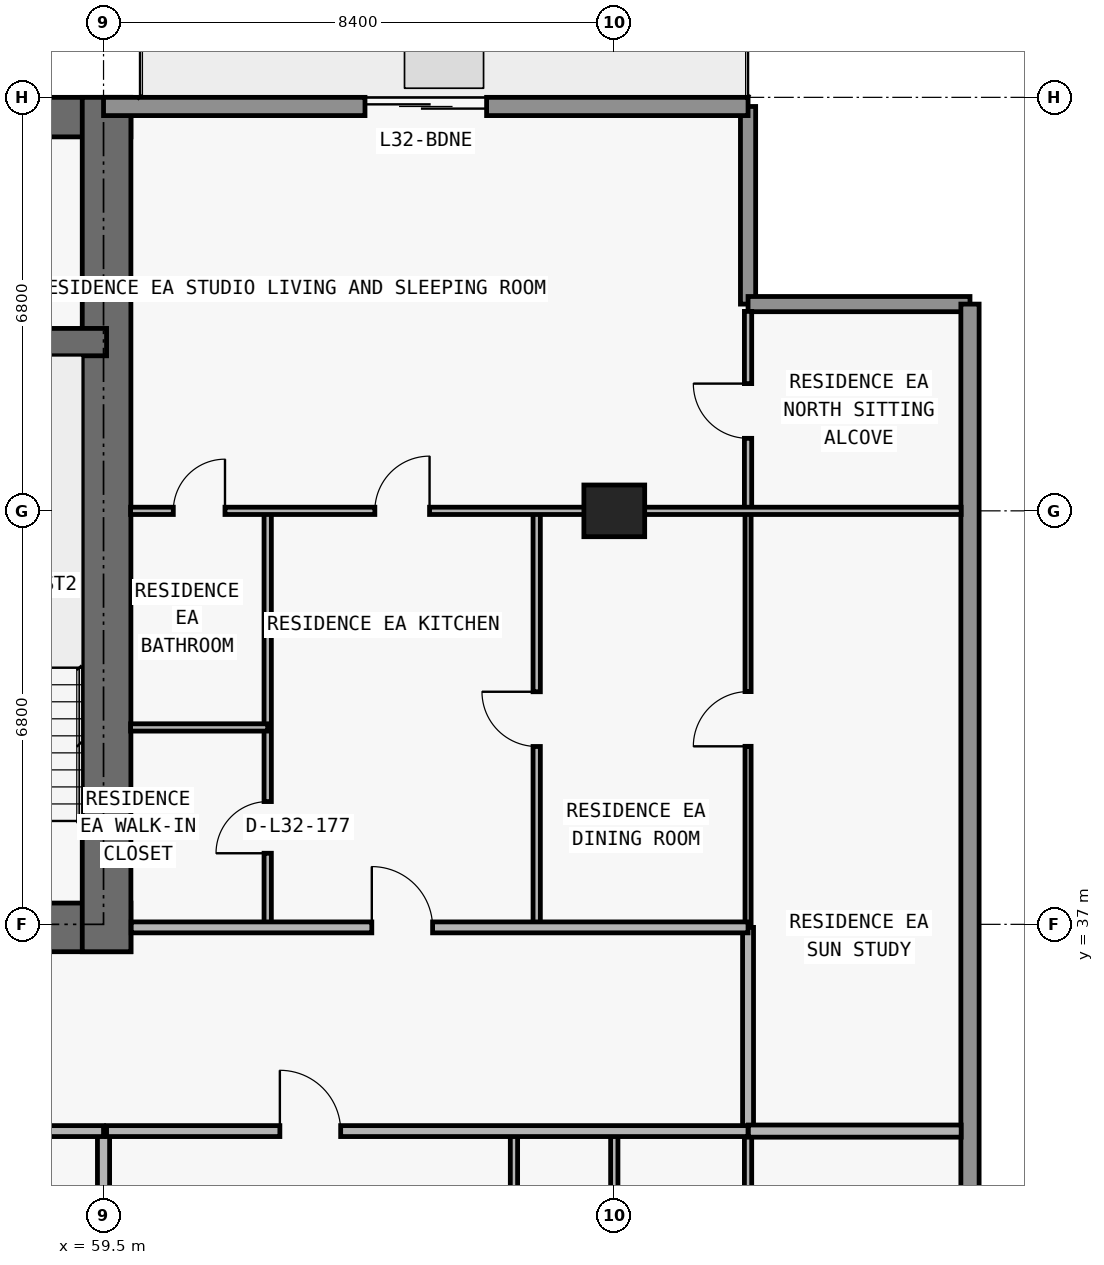
"""IFC4 building model, lengths in metres.
Left out: names, types, materials, properties, quantities, classifications, styles, units other than length and angle.
Written with IfcOpenShell. Run it as: python <this file> out.ifc"""

import sys

from ifc_helpers import new_model, si_unit, direction, frame, frame_2d, origin, origin_2d, place, context, subcontext, project, spatial, rectangle, extrude, element, fill, save


model = new_model("IFC4")
c1 = context("Model", 3, precision=1e-05, world=origin(), true_north=direction((0.0, 1.0)))
c2 = subcontext(c1, "Body", "Model", "MODEL_VIEW")
j1 = project(units=[si_unit("LENGTHUNIT", "METRE"), si_unit("PLANEANGLEUNIT", "RADIAN")], contexts=[c1])
p1 = place(None, origin())
s1 = spatial("IfcSite", under=j1, at=p1, CompositionType="ELEMENT")
p2 = place(p1, origin())
s2 = spatial("IfcBuilding", under=s1, at=p2, CompositionType="ELEMENT")
p3 = place(p2, frame((0.0, 0.0, 119.1)))
s3 = spatial("IfcBuildingStorey", under=s2, at=p3, CompositionType="ELEMENT", Elevation=119.1)
p4 = place(p3, frame((67.9, 43.8, 0.0), z_axis=(0.0, 0.0, 1.0), x_axis=(1.0, 0.0, 0.0)))
e1 = element("IfcColumn", 1, at=p4, inside=s3, PredefinedType="COLUMN", context=c2, shape_type="SweptSolid", body=[
    extrude(rectangle(XDim=1.0, YDim=0.85, at=origin_2d()), origin(), (0.0, 0.0, 1.0), 3.05),
])
p5 = place(p3, frame((17.85, 36.95, 0.0), z_axis=(0.0, 0.0, 1.0), x_axis=(1.0, 0.0, 0.0)))
e2 = element("IfcWall", 2, at=p5, inside=s3, PredefinedType="SHEAR", context=c2, shape_type="SweptSolid", body=[
    extrude(rectangle(XDim=42.1, YDim=0.8, at=frame_2d((21.05, 0.0))), origin(), (0.0, 0.0, 1.0), 3.05),
])
p6 = place(p5, frame((14.45, 0.0, 0.0)))
e3 = element("IfcOpeningElement", 3, at=p6, cuts=e2, PredefinedType="OPENING", context=c2, shape_type="SweptSolid", body=[
    extrude(rectangle(XDim=1.1, YDim=2.15, at=frame_2d((0.55, 1.075))), frame((0.0, 0.41, 0.0), z_axis=(0.0, -1.0, 0.0), x_axis=(1.0, 0.0, 0.0)), (0.0, 0.0, 1.0), 0.82),
])
p7 = place(p5, frame((6.3, 0.0, 0.0)))
e4 = element("IfcOpeningElement", 4, at=p7, cuts=e2, PredefinedType="OPENING", context=c2, shape_type="SweptSolid", body=[
    extrude(rectangle(XDim=1.05, YDim=2.15, at=frame_2d((0.525, 1.075))), frame((0.0, 0.41, 0.0), z_axis=(0.0, -1.0, 0.0), x_axis=(1.0, 0.0, 0.0)), (0.0, 0.0, 1.0), 0.82),
])
p8 = place(p5, frame((34.8, 0.0, 0.0)))
e5 = element("IfcOpeningElement", 5, at=p8, cuts=e2, PredefinedType="OPENING", context=c2, shape_type="SweptSolid", body=[
    extrude(rectangle(XDim=1.05, YDim=2.15, at=frame_2d((0.525, 1.075))), frame((0.0, 0.41, 0.0), z_axis=(0.0, -1.0, 0.0), x_axis=(1.0, 0.0, 0.0)), (0.0, 0.0, 1.0), 0.82),
])
p9 = place(p5, frame((10.913, 0.0, 0.0)))
e6 = element("IfcOpeningElement", 6, at=p9, cuts=e2, PredefinedType="OPENING", context=c2, shape_type="SweptSolid", body=[
    extrude(rectangle(XDim=1.05, YDim=2.15, at=frame_2d((0.525, 1.075))), frame((0.0, 0.41, 0.0), z_axis=(0.0, -1.0, 0.0), x_axis=(1.0, 0.0, 0.0)), (0.0, 0.0, 1.0), 0.82),
])
p10 = place(p5, frame((24.15, 0.0, 0.0)))
e7 = element("IfcOpeningElement", 7, at=p10, cuts=e2, PredefinedType="OPENING", context=c2, shape_type="SweptSolid", body=[
    extrude(rectangle(XDim=1.05, YDim=2.15, at=frame_2d((0.525, 1.075))), frame((0.0, 0.41, 0.0), z_axis=(0.0, -1.0, 0.0), x_axis=(1.0, 0.0, 0.0)), (0.0, 0.0, 1.0), 0.82),
])
p11 = place(p3, frame((17.85, 50.275, 0.0), z_axis=(0.0, 0.0, 1.0), x_axis=(1.0, 0.0, 0.0)))
e8 = element("IfcWall", 8, at=p11, inside=s3, PredefinedType="SHEAR", context=c2, shape_type="SweptSolid", body=[
    extrude(rectangle(XDim=42.1, YDim=0.65, at=frame_2d((21.05, 0.0))), origin(), (0.0, 0.0, 1.0), 3.05),
])
p12 = place(p3, frame((59.55, 36.55, 0.0), z_axis=(0.0, 0.0, 1.0), x_axis=(0.0, 1.0, 0.0)))
e9 = element("IfcWall", 9, at=p12, inside=s3, PredefinedType="SHEAR", context=c2, shape_type="SweptSolid", body=[
    extrude(rectangle(XDim=14.05, YDim=0.8, at=frame_2d((7.025, 0.0))), origin(), (0.0, 0.0, 1.0), 3.05),
])
p13 = place(p3, frame((18.25, 46.575, 0.0), z_axis=(0.0, 0.0, 1.0), x_axis=(1.0, 0.0, 0.0)))
e10 = element("IfcWall", 10, at=p13, inside=s3, PredefinedType="SHEAR", context=c2, shape_type="SweptSolid", body=[
    extrude(rectangle(XDim=41.3, YDim=0.45, at=frame_2d((20.65, 0.0))), origin(), (0.0, 0.0, 1.0), 3.05),
])
p14 = place(p13, frame((7.65, 0.0, 0.0)))
e11 = element("IfcOpeningElement", 11, at=p14, cuts=e10, PredefinedType="OPENING", context=c2, shape_type="SweptSolid", body=[
    extrude(rectangle(XDim=1.0, YDim=2.2, at=frame_2d((0.5, 1.1))), frame((0.0, 0.235, 0.0), z_axis=(0.0, -1.0, 0.0), x_axis=(1.0, 0.0, 0.0)), (0.0, 0.0, 1.0), 0.47),
])
p15 = place(p13, frame((32.675, 0.0, 0.0)))
e12 = element("IfcOpeningElement", 12, at=p15, cuts=e10, PredefinedType="OPENING", context=c2, shape_type="SweptSolid", body=[
    extrude(rectangle(XDim=1.05, YDim=2.15, at=frame_2d((0.525, 1.075))), frame((0.0, 0.235, 0.0), z_axis=(0.0, -1.0, 0.0), x_axis=(1.0, 0.0, 0.0)), (0.0, 0.0, 1.0), 0.47),
])
p16 = place(p3, frame((70.1, 50.45, 0.0), z_axis=(0.0, 0.0, 1.0), x_axis=(0.0, -1.0, 0.0)))
e13 = element("IfcWall", 13, at=p16, inside=s3, PredefinedType="ELEMENTEDWALL", context=c2, shape_type="SweptSolid", body=[
    extrude(rectangle(XDim=3.25, YDim=0.25, at=frame_2d((1.625, 0.0))), origin(), (0.0, 0.0, 1.0), 3.05),
])
p17 = place(p3, frame((70.1, 47.2, 0.0), z_axis=(0.0, 0.0, 1.0), x_axis=(1.0, 0.0, 0.0)))
e14 = element("IfcWall", 14, at=p17, inside=s3, PredefinedType="ELEMENTEDWALL", context=c2, shape_type="SweptSolid", body=[
    extrude(rectangle(XDim=3.65, YDim=0.25, at=frame_2d((1.825, 0.0))), origin(), (0.0, 0.0, 1.0), 3.05),
])
p18 = place(p3, frame((73.75, 47.2, 0.0), z_axis=(0.0, 0.0, 1.0), x_axis=(0.0, -1.0, 0.0)))
e15 = element("IfcWall", 15, at=p18, inside=s3, PredefinedType="STANDARD", context=c2, shape_type="SweptSolid", body=[
    extrude(rectangle(XDim=19.2, YDim=0.3, at=frame_2d((9.6, 0.0))), origin(), (0.0, 0.0, 1.0), 3.05),
])
p19 = place(p3, frame((59.5, 50.45, 0.0), z_axis=(0.0, 0.0, 1.0), x_axis=(1.0, 0.0, 0.0)))
e16 = element("IfcWall", 16, at=p19, inside=s3, PredefinedType="STANDARD", context=c2, shape_type="SweptSolid", body=[
    extrude(rectangle(XDim=10.6, YDim=0.3, at=frame_2d((5.3, 0.0))), origin(), (0.0, 0.0, 1.0), 3.05),
])
p20 = place(p19, frame((4.3, 0.0, 0.0)))
e17 = element("IfcOpeningElement", 17, at=p20, cuts=e16, PredefinedType="OPENING", context=c2, shape_type="SweptSolid", body=[
    extrude(rectangle(XDim=2.0, YDim=2.3, at=frame_2d((1.0, 1.15))), frame((0.0, 0.16, 0.0), z_axis=(0.0, -1.0, 0.0), x_axis=(1.0, 0.0, 0.0)), (0.0, 0.0, 1.0), 0.32),
])
p21 = place(p3, frame((59.5, 27.08, 0.0), z_axis=(0.0, 0.0, 1.0), x_axis=(0.0, 1.0, 0.0)))
e18 = element("IfcWall", 18, at=p21, inside=s3, PredefinedType="PARTITIONING", context=c2, shape_type="SweptSolid", body=[
    extrude(rectangle(XDim=6.52, YDim=0.2, at=frame_2d((3.26, 0.0))), origin(), (0.0, 0.0, 1.0), 2.174),
])
p22 = place(p3, frame((62.2, 36.95, 0.0), z_axis=(0.0, 0.0, 1.0), x_axis=(0.0, 1.0, 0.0)))
e19 = element("IfcWall", 19, at=p22, inside=s3, PredefinedType="PARTITIONING", context=c2, shape_type="SweptSolid", body=[
    extrude(rectangle(XDim=6.85, YDim=0.12, at=frame_2d((3.425, 0.0))), origin(), (0.0, 0.0, 1.0), 2.499),
])
p23 = place(p22, frame((1.219, 0.0, 0.0)))
e20 = element("IfcOpeningElement", 20, at=p23, cuts=e19, PredefinedType="OPENING", context=c2, shape_type="SweptSolid", body=[
    extrude(rectangle(XDim=0.85, YDim=2.1, at=frame_2d((0.425, 1.05))), frame((0.0, 0.07, 0.0), z_axis=(0.0, -1.0, 0.0), x_axis=(1.0, 0.0, 0.0)), (0.0, 0.0, 1.0), 0.14),
])
p24 = place(p3, frame((66.25, 27.08, 0.0), z_axis=(0.0, 0.0, 1.0), x_axis=(0.0, 1.0, 0.0)))
e21 = element("IfcWall", 21, at=p24, inside=s3, PredefinedType="PARTITIONING", context=c2, shape_type="SweptSolid", body=[
    extrude(rectangle(XDim=6.52, YDim=0.12, at=frame_2d((3.26, 0.0))), origin(), (0.0, 0.0, 1.0), 3.05),
])
p25 = place(p24, frame((3.285, 0.0, 0.0)))
e22 = element("IfcOpeningElement", 22, at=p25, cuts=e21, PredefinedType="OPENING", context=c2, shape_type="SweptSolid", body=[
    extrude(rectangle(XDim=0.85, YDim=2.1, at=frame_2d((0.425, 1.05))), frame((0.0, 0.07, 0.0), z_axis=(0.0, -1.0, 0.0), x_axis=(1.0, 0.0, 0.0)), (0.0, 0.0, 1.0), 0.14),
])
p26 = place(p3, frame((66.624, 36.95, 0.0), z_axis=(0.0, 0.0, 1.0), x_axis=(0.0, 1.0, 0.0)))
e23 = element("IfcWall", 23, at=p26, inside=s3, PredefinedType="PARTITIONING", context=c2, shape_type="SweptSolid", body=[
    extrude(rectangle(XDim=6.85, YDim=0.12, at=frame_2d((3.425, 0.0))), origin(), (0.0, 0.0, 1.0), 3.05),
])
p27 = place(p26, frame((2.975, 0.0, 0.0)))
e24 = element("IfcOpeningElement", 24, at=p27, cuts=e23, PredefinedType="OPENING", context=c2, shape_type="SweptSolid", body=[
    extrude(rectangle(XDim=0.9, YDim=2.15, at=frame_2d((0.45, 1.075))), frame((0.0, 0.07, 0.0), z_axis=(0.0, -1.0, 0.0), x_axis=(1.0, 0.0, 0.0)), (0.0, 0.0, 1.0), 0.14),
])
p28 = place(p3, frame((67.9, 27.08, 0.0), z_axis=(0.0, 0.0, 1.0), x_axis=(0.0, 1.0, 0.0)))
e25 = element("IfcWall", 25, at=p28, inside=s3, PredefinedType="PARTITIONING", context=c2, shape_type="SweptSolid", body=[
    extrude(rectangle(XDim=6.52, YDim=0.12, at=frame_2d((3.26, 0.0))), origin(), (0.0, 0.0, 1.0), 2.174),
])
p29 = place(p3, frame((70.1, 27.08, 0.0), z_axis=(0.0, 0.0, 1.0), x_axis=(0.0, 1.0, 0.0)))
e26 = element("IfcWall", 26, at=p29, inside=s3, PredefinedType="PARTITIONING", context=c2, shape_type="SweptSolid", body=[
    extrude(rectangle(XDim=6.52, YDim=0.12, at=frame_2d((3.26, 0.0))), origin(), (0.0, 0.0, 1.0), 3.05),
])
p30 = place(p3, frame((70.1, 33.605, 0.0), z_axis=(0.0, 0.0, 1.0), x_axis=(0.0, 1.0, 0.0)))
e27 = element("IfcWall", 27, at=p30, inside=s3, PredefinedType="PARTITIONING", context=c2, shape_type="SweptSolid", body=[
    extrude(rectangle(XDim=3.345, YDim=0.18, at=frame_2d((1.672, 0.0))), origin(), (0.0, 0.0, 1.0), 3.05),
])
p31 = place(p3, frame((70.1, 36.955, 0.0), z_axis=(0.0, 0.0, 1.0), x_axis=(0.0, 1.0, 0.0)))
e28 = element("IfcWall", 28, at=p31, inside=s3, PredefinedType="MOVABLE", context=c2, shape_type="SweptSolid", body=[
    extrude(rectangle(XDim=6.845, YDim=0.1, at=frame_2d((3.422, 0.0))), origin(), (0.0, 0.0, 1.0), 3.05),
])
p32 = place(p31, frame((2.972, 0.0, 0.0)))
e29 = element("IfcOpeningElement", 29, at=p32, cuts=e28, PredefinedType="OPENING", context=c2, shape_type="SweptSolid", body=[
    extrude(rectangle(XDim=0.9, YDim=2.15, at=frame_2d((0.45, 1.075))), frame((0.0, 0.06, 0.0), z_axis=(0.0, -1.0, 0.0), x_axis=(1.0, 0.0, 0.0)), (0.0, 0.0, 1.0), 0.12),
])
p33 = place(p3, frame((70.1, 43.805, 0.0), z_axis=(0.0, 0.0, 1.0), x_axis=(0.0, 1.0, 0.0)))
e30 = element("IfcWall", 30, at=p33, inside=s3, PredefinedType="PARTITIONING", context=c2, shape_type="SweptSolid", body=[
    extrude(rectangle(XDim=3.275, YDim=0.12, at=frame_2d((1.638, 0.0))), origin(), (0.0, 0.0, 1.0), 3.05),
])
p34 = place(p33, frame((1.188, 0.0, 0.0)))
e31 = element("IfcOpeningElement", 31, at=p34, cuts=e30, PredefinedType="OPENING", context=c2, shape_type="SweptSolid", body=[
    extrude(rectangle(XDim=0.9, YDim=2.15, at=frame_2d((0.45, 1.075))), frame((0.0, 0.07, 0.0), z_axis=(0.0, -1.0, 0.0), x_axis=(1.0, 0.0, 0.0)), (0.0, 0.0, 1.0), 0.14),
])
p35 = place(p3, frame((18.3, 33.6, 0.0), z_axis=(0.0, 0.0, 1.0), x_axis=(1.0, 0.0, 0.0)))
e32 = element("IfcWall", 32, at=p35, inside=s3, PredefinedType="PARTITIONING", context=c2, shape_type="SweptSolid", body=[
    extrude(rectangle(XDim=41.2, YDim=0.18, at=frame_2d((20.6, 0.0))), origin(), (0.0, 0.0, 1.0), 3.05),
])
p36 = place(p35, frame((11.35, 0.0, 0.0)))
e33 = element("IfcOpeningElement", 33, at=p36, cuts=e32, PredefinedType="OPENING", context=c2, shape_type="SweptSolid", body=[
    extrude(rectangle(XDim=1.0, YDim=2.2, at=frame_2d((0.5, 1.1))), frame((0.0, 0.1, 0.0), z_axis=(0.0, -1.0, 0.0), x_axis=(1.0, 0.0, 0.0)), (0.0, 0.0, 1.0), 0.2),
])
p37 = place(p35, frame((27.275, 0.0, 0.0)))
e34 = element("IfcOpeningElement", 34, at=p37, cuts=e32, PredefinedType="OPENING", context=c2, shape_type="SweptSolid", body=[
    extrude(rectangle(XDim=1.0, YDim=2.2, at=frame_2d((0.5, 1.1))), frame((0.0, 0.1, 0.0), z_axis=(0.0, -1.0, 0.0), x_axis=(1.0, 0.0, 0.0)), (0.0, 0.0, 1.0), 0.2),
])
p38 = place(p35, frame((35.675, 0.0, 0.0)))
e35 = element("IfcOpeningElement", 35, at=p38, cuts=e32, PredefinedType="OPENING", context=c2, shape_type="SweptSolid", body=[
    extrude(rectangle(XDim=1.0, YDim=2.2, at=frame_2d((0.5, 1.1))), frame((0.0, 0.1, 0.0), z_axis=(0.0, -1.0, 0.0), x_axis=(1.0, 0.0, 0.0)), (0.0, 0.0, 1.0), 0.2),
])
p39 = place(p3, frame((59.55, 33.6, 0.0), z_axis=(0.0, 0.0, 1.0), x_axis=(1.0, 0.0, 0.0)))
e36 = element("IfcWall", 36, at=p39, inside=s3, PredefinedType="PARTITIONING", context=c2, shape_type="SweptSolid", body=[
    extrude(rectangle(XDim=10.55, YDim=0.18, at=frame_2d((5.275, 0.0))), origin(), (0.0, 0.0, 1.0), 3.05),
])
p40 = place(p39, frame((2.85, 0.0, 0.0)))
e37 = element("IfcOpeningElement", 37, at=p40, cuts=e36, PredefinedType="OPENING", context=c2, shape_type="SweptSolid", body=[
    extrude(rectangle(XDim=1.0, YDim=2.2, at=frame_2d((0.5, 1.1))), frame((0.0, 0.1, 0.0), z_axis=(0.0, -1.0, 0.0), x_axis=(1.0, 0.0, 0.0)), (0.0, 0.0, 1.0), 0.2),
])
p41 = place(p3, frame((70.105, 33.6, 0.0), z_axis=(0.0, 0.0, 1.0), x_axis=(1.0, 0.0, 0.0)))
e38 = element("IfcWall", 38, at=p41, inside=s3, PredefinedType="PARTITIONING", context=c2, shape_type="SweptSolid", body=[
    extrude(rectangle(XDim=3.5, YDim=0.2, at=frame_2d((1.75, 0.0))), origin(), (0.0, 0.0, 1.0), 3.05),
])
p42 = place(p3, frame((59.955, 36.95, 0.0), z_axis=(0.0, 0.0, 1.0), x_axis=(1.0, 0.0, 0.0)))
e39 = element("IfcWall", 39, at=p42, inside=s3, PredefinedType="PARTITIONING", context=c2, shape_type="SweptSolid", body=[
    extrude(rectangle(XDim=10.145, YDim=0.18, at=frame_2d((5.073, 0.0))), origin(), (0.0, 0.0, 1.0), 3.05),
])
p43 = place(p42, frame((3.957, 0.0, 0.0)))
e40 = element("IfcOpeningElement", 40, at=p43, cuts=e39, PredefinedType="OPENING", context=c2, shape_type="SweptSolid", body=[
    extrude(rectangle(XDim=1.0, YDim=2.2, at=frame_2d((0.5, 1.1))), frame((0.0, 0.1, 0.0), z_axis=(0.0, -1.0, 0.0), x_axis=(1.0, 0.0, 0.0)), (0.0, 0.0, 1.0), 0.2),
])
p44 = place(p3, frame((59.945, 40.238, 0.0), z_axis=(0.0, 0.0, 1.0), x_axis=(1.0, 0.0, 0.0)))
e41 = element("IfcWall", 41, at=p44, inside=s3, PredefinedType="PARTITIONING", context=c2, shape_type="SweptSolid", body=[
    extrude(rectangle(XDim=2.255, YDim=0.12, at=frame_2d((1.127, 0.0))), origin(), (0.0, 0.0, 1.0), 3.05),
])
p45 = place(p3, frame((59.945, 43.8, 0.0), z_axis=(0.0, 0.0, 1.0), x_axis=(1.0, 0.0, 0.0)))
e42 = element("IfcWall", 42, at=p45, inside=s3, PredefinedType="PARTITIONING", context=c2, shape_type="SweptSolid", body=[
    extrude(rectangle(XDim=13.66, YDim=0.12, at=frame_2d((6.83, 0.0))), origin(), (0.0, 0.0, 1.0), 2.339),
])
p46 = place(p45, frame((4.017, 0.0, 0.0)))
e43 = element("IfcOpeningElement", 43, at=p46, cuts=e42, PredefinedType="OPENING", context=c2, shape_type="SweptSolid", body=[
    extrude(rectangle(XDim=0.9, YDim=2.15, at=frame_2d((0.45, 1.075))), frame((0.0, 0.07, 0.0), z_axis=(0.0, -1.0, 0.0), x_axis=(1.0, 0.0, 0.0)), (0.0, 0.0, 1.0), 0.14),
])
p47 = place(p45, frame((0.702, 0.0, 0.0)))
e44 = element("IfcOpeningElement", 44, at=p47, cuts=e42, PredefinedType="OPENING", context=c2, shape_type="SweptSolid", body=[
    extrude(rectangle(XDim=0.85, YDim=2.1, at=frame_2d((0.425, 1.05))), frame((0.0, 0.07, 0.0), z_axis=(0.0, -1.0, 0.0), x_axis=(1.0, 0.0, 0.0)), (0.0, 0.0, 1.0), 0.14),
])
p48 = place(p20, origin())
e45 = element("IfcDoor", 45, at=p48, inside=s3, OperationType="DOUBLE_DOOR_SLIDING", PredefinedType="DOOR", context=c2, shape_type="SweptSolid", body=[
    extrude(rectangle(XDim=2.0, YDim=2.3, at=frame_2d((1.0, 1.15))), frame((0.0, 0.025, 0.0), z_axis=(0.0, -1.0, 0.0), x_axis=(1.0, 0.0, 0.0)), (0.0, 0.0, 1.0), 0.05),
])
fill(e17, e45)
p49 = place(p40, origin())
e46 = element("IfcDoor", 46, at=p49, inside=s3, OperationType="SINGLE_SWING_LEFT", PredefinedType="DOOR", context=c2, shape_type="SweptSolid", body=[
    extrude(rectangle(XDim=1.0, YDim=2.2, at=frame_2d((0.5, 1.1))), frame((0.0, 0.025, 0.0), z_axis=(0.0, -1.0, 0.0), x_axis=(1.0, 0.0, 0.0)), (0.0, 0.0, 1.0), 0.05),
])
fill(e37, e46)
p50 = place(p27, origin())
e47 = element("IfcDoor", 47, at=p50, inside=s3, OperationType="SINGLE_SWING_RIGHT", PredefinedType="DOOR", context=c2, shape_type="SweptSolid", body=[
    extrude(rectangle(XDim=0.9, YDim=2.15, at=frame_2d((0.45, 1.075))), frame((0.0, 0.025, 0.0), z_axis=(0.0, -1.0, 0.0), x_axis=(1.0, 0.0, 0.0)), (0.0, 0.0, 1.0), 0.05),
])
fill(e24, e47)
p51 = place(p43, origin())
e48 = element("IfcDoor", 48, at=p51, inside=s3, OperationType="SINGLE_SWING_LEFT", PredefinedType="DOOR", context=c2, shape_type="SweptSolid", body=[
    extrude(rectangle(XDim=1.0, YDim=2.2, at=frame_2d((0.5, 1.1))), frame((0.0, 0.025, 0.0), z_axis=(0.0, -1.0, 0.0), x_axis=(1.0, 0.0, 0.0)), (0.0, 0.0, 1.0), 0.05),
])
fill(e40, e48)
p52 = place(p46, origin())
e49 = element("IfcDoor", 49, at=p52, inside=s3, OperationType="SINGLE_SWING_RIGHT", PredefinedType="DOOR", context=c2, shape_type="SweptSolid", body=[
    extrude(rectangle(XDim=0.9, YDim=2.15, at=frame_2d((0.45, 1.075))), frame((0.0, 0.025, 0.0), z_axis=(0.0, -1.0, 0.0), x_axis=(1.0, 0.0, 0.0)), (0.0, 0.0, 1.0), 0.05),
])
fill(e43, e49)
p53 = place(p23, origin())
e50 = element("IfcDoor", 50, at=p53, inside=s3, OperationType="SINGLE_SWING_LEFT", PredefinedType="DOOR", context=c2, shape_type="SweptSolid", body=[
    extrude(rectangle(XDim=0.85, YDim=2.1, at=frame_2d((0.425, 1.05))), frame((0.0, 0.025, 0.0), z_axis=(0.0, -1.0, 0.0), x_axis=(1.0, 0.0, 0.0)), (0.0, 0.0, 1.0), 0.05),
])
fill(e20, e50)
p54 = place(p47, origin())
e51 = element("IfcDoor", 51, at=p54, inside=s3, OperationType="SINGLE_SWING_RIGHT", PredefinedType="DOOR", context=c2, shape_type="SweptSolid", body=[
    extrude(rectangle(XDim=0.85, YDim=2.1, at=frame_2d((0.425, 1.05))), frame((0.0, 0.025, 0.0), z_axis=(0.0, -1.0, 0.0), x_axis=(1.0, 0.0, 0.0)), (0.0, 0.0, 1.0), 0.05),
])
fill(e44, e51)
p55 = place(p32, origin())
e52 = element("IfcDoor", 52, at=p55, inside=s3, OperationType="SINGLE_SWING_LEFT", PredefinedType="DOOR", context=c2, shape_type="SweptSolid", body=[
    extrude(rectangle(XDim=0.9, YDim=2.15, at=frame_2d((0.45, 1.075))), frame((0.0, 0.025, 0.0), z_axis=(0.0, -1.0, 0.0), x_axis=(1.0, 0.0, 0.0)), (0.0, 0.0, 1.0), 0.05),
])
fill(e29, e52)
p56 = place(p34, origin())
e53 = element("IfcDoor", 53, at=p56, inside=s3, OperationType="SINGLE_SWING_RIGHT", PredefinedType="DOOR", context=c2, shape_type="SweptSolid", body=[
    extrude(rectangle(XDim=0.9, YDim=2.15, at=frame_2d((0.45, 1.075))), frame((0.0, 0.025, 0.0), z_axis=(0.0, -1.0, 0.0), x_axis=(1.0, 0.0, 0.0)), (0.0, 0.0, 1.0), 0.05),
])
fill(e31, e53)
save(model, sys.argv[1])
